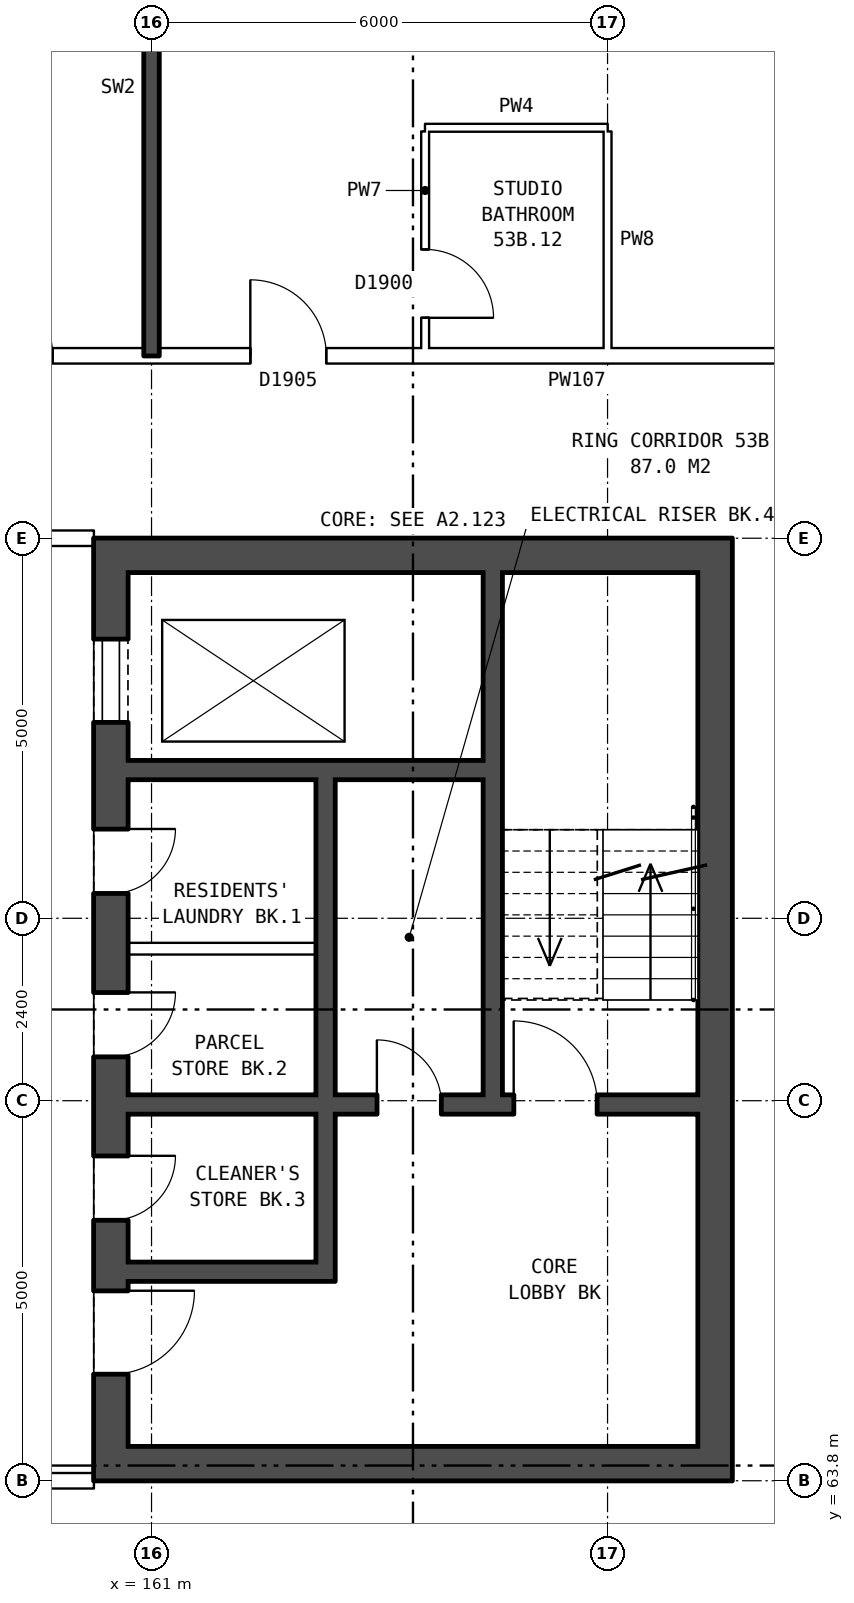
"""IFC4 building model, lengths in metres.
Left out: names, types, materials, properties, quantities, classifications, styles, units other than length and angle.
Written with IfcOpenShell. Run it as: python <this file> out.ifc"""

import sys

from ifc_helpers import new_model, si_unit, direction, frame, frame_2d, origin, place, context, subcontext, project, spatial, rectangle, extrude, element, fill, save


model = new_model("IFC4")
c1 = context("Model", 3, precision=1e-05, world=origin(), true_north=direction((0.0, 1.0)))
c2 = subcontext(c1, "Body", "Model", "MODEL_VIEW")
j1 = project(units=[si_unit("LENGTHUNIT", "METRE"), si_unit("PLANEANGLEUNIT", "RADIAN")], contexts=[c1])
p1 = place(None, origin())
s1 = spatial("IfcSite", under=j1, at=p1, CompositionType="ELEMENT")
p2 = place(p1, origin())
s2 = spatial("IfcBuilding", under=s1, at=p2, CompositionType="ELEMENT")
p3 = place(p2, frame((0.0, 0.0, 188.2)))
s3 = spatial("IfcBuildingStorey", under=s2, at=p3, CompositionType="ELEMENT", Elevation=188.2)
p4 = place(p3, frame((160.465, 76.2, 0.0), z_axis=(0.0, 0.0, 1.0), x_axis=(0.0, -1.0, 0.0)))
e1 = element("IfcWall", 1, at=p4, inside=s3, PredefinedType="SHEAR", context=c2, shape_type="SweptSolid", body=[
    extrude(rectangle(XDim=12.4, YDim=0.45, at=frame_2d((6.2, 0.0))), origin(), (0.0, 0.0, 1.0), 2.85),
])
p5 = place(p4, frame((1.325, 0.0, 0.0)))
e2 = element("IfcOpeningElement", 2, at=p5, cuts=e1, PredefinedType="OPENING", context=c2, shape_type="SweptSolid", body=[
    extrude(rectangle(XDim=1.1, YDim=2.1, at=frame_2d((0.55, 1.05))), frame((0.0, 0.235, 0.0), z_axis=(0.0, -1.0, 0.0), x_axis=(1.0, 0.0, 0.0)), (0.0, 0.0, 1.0), 0.47),
])
p6 = place(p4, frame((3.825, 0.0, 0.0)))
e3 = element("IfcOpeningElement", 3, at=p6, cuts=e1, PredefinedType="OPENING", context=c2, shape_type="SweptSolid", body=[
    extrude(rectangle(XDim=0.85, YDim=2.1, at=frame_2d((0.425, 1.05))), frame((0.0, 0.235, 0.0), z_axis=(0.0, -1.0, 0.0), x_axis=(1.0, 0.0, 0.0)), (0.0, 0.0, 1.0), 0.47),
])
p7 = place(p4, frame((5.975, 0.0, 0.0)))
e4 = element("IfcOpeningElement", 4, at=p7, cuts=e1, PredefinedType="OPENING", context=c2, shape_type="SweptSolid", body=[
    extrude(rectangle(XDim=0.85, YDim=2.1, at=frame_2d((0.425, 1.05))), frame((0.0, 0.235, 0.0), z_axis=(0.0, -1.0, 0.0), x_axis=(1.0, 0.0, 0.0)), (0.0, 0.0, 1.0), 0.47),
])
p8 = place(p4, frame((9.9, 0.0, 0.0)))
e5 = element("IfcOpeningElement", 5, at=p8, cuts=e1, PredefinedType="OPENING", context=c2, shape_type="SweptSolid", body=[
    extrude(rectangle(XDim=1.1, YDim=2.1, at=frame_2d((0.55, 1.05))), frame((0.0, 0.235, 0.0), z_axis=(0.0, -1.0, 0.0), x_axis=(1.0, 0.0, 0.0)), (0.0, 0.0, 1.0), 0.47),
])
p9 = place(p4, frame((8.125, 0.0, 0.0)))
e6 = element("IfcOpeningElement", 6, at=p9, cuts=e1, PredefinedType="OPENING", context=c2, shape_type="SweptSolid", body=[
    extrude(rectangle(XDim=0.85, YDim=2.1, at=frame_2d((0.425, 1.05))), frame((0.0, 0.235, 0.0), z_axis=(0.0, -1.0, 0.0), x_axis=(1.0, 0.0, 0.0)), (0.0, 0.0, 1.0), 0.47),
])
p10 = place(p3, frame((168.415, 76.2, 0.0), z_axis=(0.0, 0.0, 1.0), x_axis=(0.0, -1.0, 0.0)))
e7 = element("IfcWall", 7, at=p10, inside=s3, PredefinedType="SHEAR", context=c2, shape_type="SweptSolid", body=[
    extrude(rectangle(XDim=12.4, YDim=0.45, at=frame_2d((6.2, 0.0))), origin(), (0.0, 0.0, 1.0), 2.85),
])
for number, where, z_axis, x_axis in (
    (8, (160.69, 75.975, 0.0), (0.0, 0.0, 1.0), (1.0, 0.0, 0.0)),
    (9, (160.69, 64.025, 0.0), (0.0, 0.0, 1.0), (1.0, 0.0, 0.0)),
):
    element("IfcWall", number, at=place(p3, frame(where, z_axis=z_axis, x_axis=x_axis)), inside=s3, PredefinedType="SHEAR", context=c2, shape_type="SweptSolid", body=[
        extrude(rectangle(XDim=7.5, YDim=0.45, at=frame_2d((3.75, 0.0))), origin(), (0.0, 0.0, 1.0), 2.85),
    ])
p11 = place(p3, frame((160.69, 73.15, 0.0), z_axis=(0.0, 0.0, 1.0), x_axis=(1.0, 0.0, 0.0)))
e10 = element("IfcWall", 10, at=p11, inside=s3, PredefinedType="SHEAR", context=c2, shape_type="SweptSolid", body=[
    extrude(rectangle(XDim=4.675, YDim=0.25, at=frame_2d((2.337, 0.0))), origin(), (0.0, 0.0, 1.0), 2.85),
])
p12 = place(p3, frame((160.69, 70.8, 0.0), z_axis=(0.0, 0.0, 1.0), x_axis=(1.0, 0.0, 0.0)))
e11 = element("IfcWall", 11, at=p12, inside=s3, PredefinedType="PARTITIONING", context=c2, shape_type="SweptSolid", body=[
    extrude(rectangle(XDim=2.475, YDim=0.15, at=frame_2d((1.238, 0.0))), origin(), (0.0, 0.0, 1.0), 2.85),
])
p13 = place(p3, frame((160.69, 68.75, 0.0), z_axis=(0.0, 0.0, 1.0), x_axis=(1.0, 0.0, 0.0)))
e12 = element("IfcWall", 12, at=p13, inside=s3, PredefinedType="SHEAR", context=c2, shape_type="SweptSolid", body=[
    extrude(rectangle(XDim=7.5, YDim=0.25, at=frame_2d((3.75, 0.0))), origin(), (0.0, 0.0, 1.0), 2.85),
])
p14 = place(p13, frame((5.075, 0.0, 0.0)))
e13 = element("IfcOpeningElement", 13, at=p14, cuts=e12, PredefinedType="OPENING", context=c2, shape_type="SweptSolid", body=[
    extrude(rectangle(XDim=1.1, YDim=2.1, at=frame_2d((0.55, 1.05))), frame((0.0, 0.135, 0.0), z_axis=(0.0, -1.0, 0.0), x_axis=(1.0, 0.0, 0.0)), (0.0, 0.0, 1.0), 0.27),
])
p15 = place(p13, frame((3.275, 0.0, 0.0)))
e14 = element("IfcOpeningElement", 14, at=p15, cuts=e12, PredefinedType="OPENING", context=c2, shape_type="SweptSolid", body=[
    extrude(rectangle(XDim=0.85, YDim=2.1, at=frame_2d((0.425, 1.05))), frame((0.0, 0.135, 0.0), z_axis=(0.0, -1.0, 0.0), x_axis=(1.0, 0.0, 0.0)), (0.0, 0.0, 1.0), 0.27),
])
p16 = place(p3, frame((160.69, 66.55, 0.0), z_axis=(0.0, 0.0, 1.0), x_axis=(1.0, 0.0, 0.0)))
e15 = element("IfcWall", 15, at=p16, inside=s3, PredefinedType="SHEAR", context=c2, shape_type="SweptSolid", body=[
    extrude(rectangle(XDim=2.475, YDim=0.25, at=frame_2d((1.238, 0.0))), origin(), (0.0, 0.0, 1.0), 2.85),
])
p17 = place(p3, frame((163.29, 73.025, 0.0), z_axis=(0.0, 0.0, 1.0), x_axis=(0.0, -1.0, 0.0)))
e16 = element("IfcWall", 16, at=p17, inside=s3, PredefinedType="SHEAR", context=c2, shape_type="SweptSolid", body=[
    extrude(rectangle(XDim=4.15, YDim=0.25, at=frame_2d((2.075, 0.0))), origin(), (0.0, 0.0, 1.0), 2.85),
])
p18 = place(p3, frame((163.29, 68.625, 0.0), z_axis=(0.0, 0.0, 1.0), x_axis=(0.0, -1.0, 0.0)))
e17 = element("IfcWall", 17, at=p18, inside=s3, PredefinedType="SHEAR", context=c2, shape_type="SweptSolid", body=[
    extrude(rectangle(XDim=2.2, YDim=0.25, at=frame_2d((1.1, 0.0))), origin(), (0.0, 0.0, 1.0), 2.85),
])
p19 = place(p3, frame((165.49, 75.75, 0.0), z_axis=(0.0, 0.0, 1.0), x_axis=(0.0, -1.0, 0.0)))
e18 = element("IfcWall", 18, at=p19, inside=s3, PredefinedType="SHEAR", context=c2, shape_type="SweptSolid", body=[
    extrude(rectangle(XDim=6.875, YDim=0.25, at=frame_2d((3.438, 0.0))), origin(), (0.0, 0.0, 1.0), 2.85),
])
p20 = place(p3, frame((157.24, 63.8, 0.0), z_axis=(0.0, 0.0, 1.0), x_axis=(1.0, 0.0, 0.0)))
e19 = element("IfcWall", 19, at=p20, inside=s3, PredefinedType="PARTITIONING", context=c2, shape_type="SweptSolid", body=[
    extrude(rectangle(XDim=3.0, YDim=0.2, at=frame_2d((1.5, 0.0))), origin(), (0.0, 0.0, 1.0), 2.85),
])
p21 = place(p20, frame((1.0, 0.0, 0.0)))
e20 = element("IfcOpeningElement", 20, at=p21, cuts=e19, PredefinedType="OPENING", context=c2, shape_type="SweptSolid", body=[
    extrude(rectangle(XDim=1.0, YDim=2.1, at=frame_2d((0.5, 1.05))), frame((0.0, 0.11, 0.0), z_axis=(0.0, -1.0, 0.0), x_axis=(1.0, 0.0, 0.0)), (0.0, 0.0, 1.0), 0.22),
])
p22 = place(p3, frame((157.24, 76.2, 0.0), z_axis=(0.0, 0.0, 1.0), x_axis=(1.0, 0.0, 0.0)))
e21 = element("IfcWall", 21, at=p22, inside=s3, PredefinedType="PARTITIONING", context=c2, shape_type="SweptSolid", body=[
    extrude(rectangle(XDim=3.0, YDim=0.2, at=frame_2d((1.5, 0.0))), origin(), (0.0, 0.0, 1.0), 2.85),
])
p23 = place(p22, frame((1.0, 0.0, 0.0)))
e22 = element("IfcOpeningElement", 22, at=p23, cuts=e21, PredefinedType="OPENING", context=c2, shape_type="SweptSolid", body=[
    extrude(rectangle(XDim=1.0, YDim=2.1, at=frame_2d((0.5, 1.05))), frame((0.0, 0.11, 0.0), z_axis=(0.0, -1.0, 0.0), x_axis=(1.0, 0.0, 0.0)), (0.0, 0.0, 1.0), 0.22),
])
p24 = place(p3, frame((155.1, 78.6, 0.0), z_axis=(0.0, 0.0, 1.0), x_axis=(1.0, 0.0, 0.0)))
e23 = element("IfcWall", 23, at=p24, inside=s3, PredefinedType="PARTITIONING", context=c2, shape_type="SweptSolid", body=[
    extrude(rectangle(XDim=14.79, YDim=0.2, at=frame_2d((7.395, 0.0))), origin(), (0.0, 0.0, 1.0), 2.85),
])
p25 = place(p24, frame((3.6, 0.0, 0.0)))
e24 = element("IfcOpeningElement", 24, at=p25, cuts=e23, PredefinedType="OPENING", context=c2, shape_type="SweptSolid", body=[
    extrude(rectangle(XDim=1.0, YDim=2.1, at=frame_2d((0.5, 1.05))), frame((0.0, 0.11, 0.0), z_axis=(0.0, -1.0, 0.0), x_axis=(1.0, 0.0, 0.0)), (0.0, 0.0, 1.0), 0.22),
])
p26 = place(p24, frame((7.2, 0.0, 0.0)))
e25 = element("IfcOpeningElement", 25, at=p26, cuts=e23, PredefinedType="OPENING", context=c2, shape_type="SweptSolid", body=[
    extrude(rectangle(XDim=1.0, YDim=2.1, at=frame_2d((0.5, 1.05))), frame((0.0, 0.11, 0.0), z_axis=(0.0, -1.0, 0.0), x_axis=(1.0, 0.0, 0.0)), (0.0, 0.0, 1.0), 0.22),
])
p27 = place(p3, frame((164.6, 81.6, 0.0), z_axis=(0.0, 0.0, 1.0), x_axis=(1.0, 0.0, 0.0)))
e26 = element("IfcWall", 26, at=p27, inside=s3, PredefinedType="PARTITIONING", context=c2, shape_type="SweptSolid", body=[
    extrude(rectangle(XDim=2.4, YDim=0.1, at=frame_2d((1.2, 0.0))), origin(), (0.0, 0.0, 1.0), 2.85),
])
p28 = place(p3, frame((161.0, 78.6, 0.0), z_axis=(0.0, 0.0, 1.0), x_axis=(0.0, 1.0, 0.0)))
e27 = element("IfcWall", 27, at=p28, inside=s3, PredefinedType="SOLIDWALL", context=c2, shape_type="SweptSolid", body=[
    extrude(rectangle(XDim=7.04, YDim=0.2, at=frame_2d((3.52, 0.0))), origin(), (0.0, 0.0, 1.0), 2.85),
])
p29 = place(p3, frame((164.6, 78.7, 0.0), z_axis=(0.0, 0.0, 1.0), x_axis=(0.0, 1.0, 0.0)))
e28 = element("IfcWall", 28, at=p29, inside=s3, PredefinedType="PARTITIONING", context=c2, shape_type="SweptSolid", body=[
    extrude(rectangle(XDim=2.85, YDim=0.1, at=frame_2d((1.425, 0.0))), origin(), (0.0, 0.0, 1.0), 2.85),
])
p30 = place(p29, frame((0.4, 0.0, 0.0)))
e29 = element("IfcOpeningElement", 29, at=p30, cuts=e28, PredefinedType="OPENING", context=c2, shape_type="SweptSolid", body=[
    extrude(rectangle(XDim=0.9, YDim=2.1, at=frame_2d((0.45, 1.05))), frame((0.0, 0.06, 0.0), z_axis=(0.0, -1.0, 0.0), x_axis=(1.0, 0.0, 0.0)), (0.0, 0.0, 1.0), 0.12),
])
p31 = place(p3, frame((167.0, 78.7, 0.0), z_axis=(0.0, 0.0, 1.0), x_axis=(0.0, 1.0, 0.0)))
e30 = element("IfcWall", 30, at=p31, inside=s3, PredefinedType="PARTITIONING", context=c2, shape_type="SweptSolid", body=[
    extrude(rectangle(XDim=2.85, YDim=0.1, at=frame_2d((1.425, 0.0))), origin(), (0.0, 0.0, 1.0), 2.85),
])
p32 = place(p5, origin())
e31 = element("IfcDoor", 31, at=p32, inside=s3, OperationType="DOUBLE_DOOR_SLIDING", PredefinedType="DOOR", context=c2, shape_type="SweptSolid", body=[
    extrude(rectangle(XDim=1.1, YDim=2.1, at=frame_2d((0.55, 1.05))), frame((0.0, 0.21, 0.0), z_axis=(0.0, -1.0, 0.0), x_axis=(1.0, 0.0, 0.0)), (0.0, 0.0, 1.0), 0.05),
])
fill(e2, e31)
p33 = place(p6, origin())
e32 = element("IfcDoor", 32, at=p33, inside=s3, OperationType="SINGLE_SWING_LEFT", PredefinedType="DOOR", context=c2, shape_type="SweptSolid", body=[
    extrude(rectangle(XDim=0.85, YDim=2.1, at=frame_2d((0.425, 1.05))), frame((0.0, 0.21, 0.0), z_axis=(0.0, -1.0, 0.0), x_axis=(1.0, 0.0, 0.0)), (0.0, 0.0, 1.0), 0.05),
])
fill(e3, e32)
p34 = place(p7, origin())
e33 = element("IfcDoor", 33, at=p34, inside=s3, OperationType="SINGLE_SWING_LEFT", PredefinedType="DOOR", context=c2, shape_type="SweptSolid", body=[
    extrude(rectangle(XDim=0.85, YDim=2.1, at=frame_2d((0.425, 1.05))), frame((0.0, 0.21, 0.0), z_axis=(0.0, -1.0, 0.0), x_axis=(1.0, 0.0, 0.0)), (0.0, 0.0, 1.0), 0.05),
])
fill(e4, e33)
p35 = place(p8, origin())
e34 = element("IfcDoor", 34, at=p35, inside=s3, OperationType="SINGLE_SWING_LEFT", PredefinedType="DOOR", context=c2, shape_type="SweptSolid", body=[
    extrude(rectangle(XDim=1.1, YDim=2.1, at=frame_2d((0.55, 1.05))), frame((0.0, 0.21, 0.0), z_axis=(0.0, -1.0, 0.0), x_axis=(1.0, 0.0, 0.0)), (0.0, 0.0, 1.0), 0.05),
])
fill(e5, e34)
p36 = place(p14, origin())
e35 = element("IfcDoor", 35, at=p36, inside=s3, OperationType="SINGLE_SWING_LEFT", PredefinedType="DOOR", context=c2, shape_type="SweptSolid", body=[
    extrude(rectangle(XDim=1.1, YDim=2.1, at=frame_2d((0.55, 1.05))), frame((0.0, 0.025, 0.0), z_axis=(0.0, -1.0, 0.0), x_axis=(1.0, 0.0, 0.0)), (0.0, 0.0, 1.0), 0.05),
])
fill(e13, e35)
p37 = place(p9, origin())
e36 = element("IfcDoor", 36, at=p37, inside=s3, OperationType="SINGLE_SWING_LEFT", PredefinedType="DOOR", context=c2, shape_type="SweptSolid", body=[
    extrude(rectangle(XDim=0.85, YDim=2.1, at=frame_2d((0.425, 1.05))), frame((0.0, 0.21, 0.0), z_axis=(0.0, -1.0, 0.0), x_axis=(1.0, 0.0, 0.0)), (0.0, 0.0, 1.0), 0.05),
])
fill(e6, e36)
p38 = place(p15, origin())
e37 = element("IfcDoor", 37, at=p38, inside=s3, OperationType="SINGLE_SWING_LEFT", PredefinedType="DOOR", context=c2, shape_type="SweptSolid", body=[
    extrude(rectangle(XDim=0.85, YDim=2.1, at=frame_2d((0.425, 1.05))), frame((0.0, 0.025, 0.0), z_axis=(0.0, -1.0, 0.0), x_axis=(1.0, 0.0, 0.0)), (0.0, 0.0, 1.0), 0.05),
])
fill(e14, e37)
p39 = place(p25, origin())
e38 = element("IfcDoor", 38, at=p39, inside=s3, OperationType="SINGLE_SWING_LEFT", PredefinedType="DOOR", context=c2, shape_type="SweptSolid", body=[
    extrude(rectangle(XDim=1.0, YDim=2.1, at=frame_2d((0.5, 1.05))), frame((0.0, 0.025, 0.0), z_axis=(0.0, -1.0, 0.0), x_axis=(1.0, 0.0, 0.0)), (0.0, 0.0, 1.0), 0.05),
])
fill(e24, e38)
p40 = place(p26, origin())
e39 = element("IfcDoor", 39, at=p40, inside=s3, OperationType="SINGLE_SWING_LEFT", PredefinedType="DOOR", context=c2, shape_type="SweptSolid", body=[
    extrude(rectangle(XDim=1.0, YDim=2.1, at=frame_2d((0.5, 1.05))), frame((0.0, 0.025, 0.0), z_axis=(0.0, -1.0, 0.0), x_axis=(1.0, 0.0, 0.0)), (0.0, 0.0, 1.0), 0.05),
])
fill(e25, e39)
p41 = place(p30, frame((0.9, 0.0, 0.0), z_axis=(0.0, 0.0, 1.0), x_axis=(-1.0, 0.0, 0.0)))
e40 = element("IfcDoor", 40, at=p41, inside=s3, OperationType="SINGLE_SWING_RIGHT", PredefinedType="DOOR", context=c2, shape_type="SweptSolid", body=[
    extrude(rectangle(XDim=0.9, YDim=2.1, at=frame_2d((0.45, 1.05))), frame((0.0, 0.025, 0.0), z_axis=(0.0, -1.0, 0.0), x_axis=(1.0, 0.0, 0.0)), (0.0, 0.0, 1.0), 0.05),
])
fill(e29, e40)
save(model, sys.argv[1])
